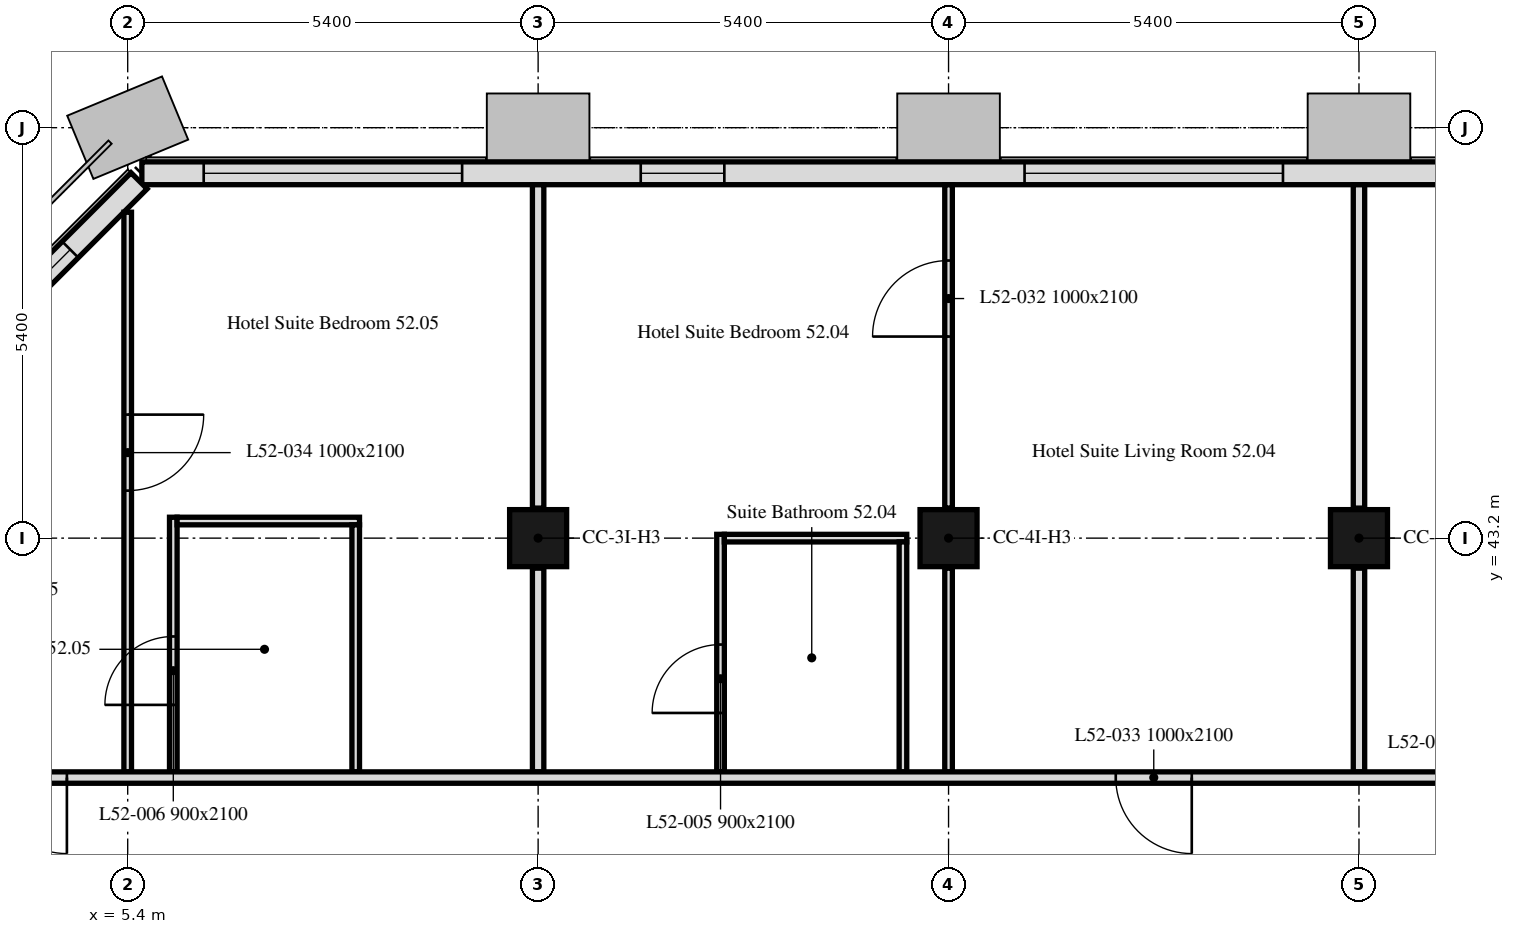
"""IFC4 building model, lengths in metres.
Left out: names, types, materials, properties, quantities, classifications, styles, units other than length and angle.
Written with IfcOpenShell. Run it as: python <this file> out.ifc"""

import sys

from ifc_helpers import new_model, si_unit, direction, frame, frame_2d, origin, origin_2d, place, context, subcontext, project, spatial, rectangle, extrude, element, fill, save


model = new_model("IFC4")
c1 = context("Model", 3, precision=1e-05, world=origin(), true_north=direction((0.0, 1.0)))
c2 = subcontext(c1, "Body", "Model", "MODEL_VIEW")
j1 = project(units=[si_unit("LENGTHUNIT", "METRE"), si_unit("PLANEANGLEUNIT", "RADIAN")], contexts=[c1])
p1 = place(None, origin())
s1 = spatial("IfcSite", under=j1, at=p1, CompositionType="ELEMENT")
p2 = place(p1, origin())
s2 = spatial("IfcBuilding", under=s1, at=p2, CompositionType="ELEMENT")
p3 = place(p2, frame((0.0, 0.0, 210.4)))
s3 = spatial("IfcBuildingStorey", under=s2, at=p3, CompositionType="ELEMENT", Elevation=210.4)
for number, where, z_axis, x_axis in (
    (1, (10.8, 43.2, 0.0), (0.0, 0.0, 1.0), (1.0, 0.0, 0.0)),
    (2, (16.2, 43.2, 0.0), (0.0, 0.0, 1.0), (1.0, 0.0, 0.0)),
    (3, (21.6, 43.2, 0.0), (0.0, 0.0, 1.0), (1.0, 0.0, 0.0)),
):
    element("IfcColumn", number, at=place(p3, frame(where, z_axis=z_axis, x_axis=x_axis)), inside=s3, PredefinedType="COLUMN", context=c2, shape_type="SweptSolid", body=[
        extrude(rectangle(XDim=0.75, YDim=0.75, at=origin_2d()), origin(), (0.0, 0.0, 1.0), 3.0),
    ])
p4 = place(p3, frame((37.614, 48.0, 0.0), z_axis=(0.0, 0.0, 1.0), x_axis=(-1.0, 0.0, 0.0)))
e4 = element("IfcWall", 4, at=p4, inside=s3, PredefinedType="SOLIDWALL", context=c2, shape_type="SweptSolid", body=[
    extrude(rectangle(XDim=32.027, YDim=0.3, at=frame_2d((16.014, 0.0))), origin(), (0.0, 0.0, 1.0), 3.0),
])
p5 = place(p4, frame((2.764, 0.0, 0.9)))
e5 = element("IfcOpeningElement", 5, at=p5, cuts=e4, PredefinedType="OPENING", context=c2, shape_type="SweptSolid", body=[
    extrude(rectangle(XDim=1.1, YDim=1.7, at=frame_2d((0.55, 0.85))), frame((0.0, 0.16, 0.0), z_axis=(0.0, -1.0, 0.0), x_axis=(1.0, 0.0, 0.0)), (0.0, 0.0, 1.0), 0.32),
])
p6 = place(p4, frame((6.214, 0.0, 0.9)))
e6 = element("IfcOpeningElement", 6, at=p6, cuts=e4, PredefinedType="OPENING", context=c2, shape_type="SweptSolid", body=[
    extrude(rectangle(XDim=3.4, YDim=1.7, at=frame_2d((1.7, 0.85))), frame((0.0, 0.16, 0.0), z_axis=(0.0, -1.0, 0.0), x_axis=(1.0, 0.0, 0.0)), (0.0, 0.0, 1.0), 0.32),
])
p7 = place(p4, frame((13.564, 0.0, 0.9)))
e7 = element("IfcOpeningElement", 7, at=p7, cuts=e4, PredefinedType="OPENING", context=c2, shape_type="SweptSolid", body=[
    extrude(rectangle(XDim=1.1, YDim=1.7, at=frame_2d((0.55, 0.85))), frame((0.0, 0.16, 0.0), z_axis=(0.0, -1.0, 0.0), x_axis=(1.0, 0.0, 0.0)), (0.0, 0.0, 1.0), 0.32),
])
p8 = place(p4, frame((17.014, 0.0, 0.9)))
e8 = element("IfcOpeningElement", 8, at=p8, cuts=e4, PredefinedType="OPENING", context=c2, shape_type="SweptSolid", body=[
    extrude(rectangle(XDim=3.4, YDim=1.7, at=frame_2d((1.7, 0.85))), frame((0.0, 0.16, 0.0), z_axis=(0.0, -1.0, 0.0), x_axis=(1.0, 0.0, 0.0)), (0.0, 0.0, 1.0), 0.32),
])
p9 = place(p4, frame((24.364, 0.0, 0.9)))
e9 = element("IfcOpeningElement", 9, at=p9, cuts=e4, PredefinedType="OPENING", context=c2, shape_type="SweptSolid", body=[
    extrude(rectangle(XDim=1.1, YDim=1.7, at=frame_2d((0.55, 0.85))), frame((0.0, 0.16, 0.0), z_axis=(0.0, -1.0, 0.0), x_axis=(1.0, 0.0, 0.0)), (0.0, 0.0, 1.0), 0.32),
])
p10 = place(p4, frame((27.814, 0.0, 0.9)))
e10 = element("IfcOpeningElement", 10, at=p10, cuts=e4, PredefinedType="OPENING", context=c2, shape_type="SweptSolid", body=[
    extrude(rectangle(XDim=3.4, YDim=1.7, at=frame_2d((1.7, 0.85))), frame((0.0, 0.16, 0.0), z_axis=(0.0, -1.0, 0.0), x_axis=(1.0, 0.0, 0.0)), (0.0, 0.0, 1.0), 0.32),
])
p11 = place(p3, frame((5.55, 47.901, 0.0), z_axis=(0.0, 0.0, 1.0), x_axis=(-0.707106781187, -0.707106781187, 0.0)))
e11 = element("IfcWall", 11, at=p11, inside=s3, PredefinedType="SOLIDWALL", context=c2, shape_type="SweptSolid", body=[
    extrude(rectangle(XDim=6.86, YDim=0.3, at=frame_2d((3.43, 0.0))), origin(), (0.0, 0.0, 1.0), 3.0),
])
p12 = place(p11, frame((1.28, 0.0, 0.9)))
e12 = element("IfcOpeningElement", 12, at=p12, cuts=e11, PredefinedType="OPENING", context=c2, shape_type="SweptSolid", body=[
    extrude(rectangle(XDim=1.1, YDim=1.7, at=frame_2d((0.55, 0.85))), frame((0.0, 0.16, 0.0), z_axis=(0.0, -1.0, 0.0), x_axis=(1.0, 0.0, 0.0)), (0.0, 0.0, 1.0), 0.32),
])
p13 = place(p11, frame((4.48, 0.0, 0.9)))
e13 = element("IfcOpeningElement", 13, at=p13, cuts=e11, PredefinedType="OPENING", context=c2, shape_type="SweptSolid", body=[
    extrude(rectangle(XDim=1.1, YDim=1.7, at=frame_2d((0.55, 0.85))), frame((0.0, 0.16, 0.0), z_axis=(0.0, -1.0, 0.0), x_axis=(1.0, 0.0, 0.0)), (0.0, 0.0, 1.0), 0.32),
])
p14 = place(p3, frame((21.6, 47.849, 0.0), z_axis=(0.0, 0.0, 1.0), x_axis=(0.0, -1.0, 0.0)))
e14 = element("IfcWall", 14, at=p14, inside=s3, PredefinedType="PARTITIONING", context=c2, shape_type="SweptSolid", body=[
    extrude(rectangle(XDim=4.254, YDim=0.15, at=frame_2d((2.127, 0.0))), origin(), (0.0, 0.0, 1.0), 2.4),
])
p15 = place(p3, frame((21.6, 42.805, 0.0), z_axis=(0.0, 0.0, 1.0), x_axis=(0.0, -1.0, 0.0)))
e15 = element("IfcWall", 15, at=p15, inside=s3, PredefinedType="PARTITIONING", context=c2, shape_type="SweptSolid", body=[
    extrude(rectangle(XDim=2.68, YDim=0.15, at=frame_2d((1.34, 0.0))), origin(), (0.0, 0.0, 1.0), 2.4),
])
p16 = place(p3, frame((10.8, 47.849, 0.0), z_axis=(0.0, 0.0, 1.0), x_axis=(0.0, -1.0, 0.0)))
e16 = element("IfcWall", 16, at=p16, inside=s3, PredefinedType="PARTITIONING", context=c2, shape_type="SweptSolid", body=[
    extrude(rectangle(XDim=4.254, YDim=0.15, at=frame_2d((2.127, 0.0))), origin(), (0.0, 0.0, 1.0), 2.4),
])
p17 = place(p3, frame((10.8, 42.805, 0.0), z_axis=(0.0, 0.0, 1.0), x_axis=(0.0, -1.0, 0.0)))
e17 = element("IfcWall", 17, at=p17, inside=s3, PredefinedType="PARTITIONING", context=c2, shape_type="SweptSolid", body=[
    extrude(rectangle(XDim=2.68, YDim=0.15, at=frame_2d((1.34, 0.0))), origin(), (0.0, 0.0, 1.0), 2.4),
])
p18 = place(p3, frame((13.2, 40.125, 0.0), z_axis=(0.0, 0.0, 1.0), x_axis=(0.0, 1.0, 0.0)))
e18 = element("IfcWall", 18, at=p18, inside=s3, PredefinedType="PARTITIONING", context=c2, shape_type="SweptSolid", body=[
    extrude(rectangle(XDim=3.125, YDim=0.1, at=frame_2d((1.562, 0.0))), origin(), (0.0, 0.0, 1.0), 3.0),
])
p19 = place(p18, frame((0.775, 0.0, 0.0)))
e19 = element("IfcOpeningElement", 19, at=p19, cuts=e18, PredefinedType="OPENING", context=c2, shape_type="SweptSolid", body=[
    extrude(rectangle(XDim=0.9, YDim=2.1, at=frame_2d((0.45, 1.05))), frame((0.0, 0.05, 0.0), z_axis=(0.0, -1.0, 0.0), x_axis=(1.0, 0.0, 0.0)), (0.0, 0.0, 1.0), 0.1),
])
p20 = place(p3, frame((13.25, 43.2, 0.0), z_axis=(0.0, 0.0, 1.0), x_axis=(1.0, 0.0, 0.0)))
e20 = element("IfcWall", 20, at=p20, inside=s3, PredefinedType="PARTITIONING", context=c2, shape_type="SweptSolid", body=[
    extrude(rectangle(XDim=2.4, YDim=0.1, at=frame_2d((1.2, 0.0))), origin(), (0.0, 0.0, 1.0), 3.0),
])
p21 = place(p3, frame((15.6, 43.15, 0.0), z_axis=(0.0, 0.0, 1.0), x_axis=(0.0, -1.0, 0.0)))
e21 = element("IfcWall", 21, at=p21, inside=s3, PredefinedType="PARTITIONING", context=c2, shape_type="SweptSolid", body=[
    extrude(rectangle(XDim=3.025, YDim=0.1, at=frame_2d((1.512, 0.0))), origin(), (0.0, 0.0, 1.0), 3.0),
])
p22 = place(p3, frame((16.2, 40.125, 0.0), z_axis=(0.0, 0.0, 1.0), x_axis=(0.0, 1.0, 0.0)))
e22 = element("IfcWall", 22, at=p22, inside=s3, PredefinedType="PARTITIONING", context=c2, shape_type="SweptSolid", body=[
    extrude(rectangle(XDim=2.68, YDim=0.1, at=frame_2d((1.34, 0.0))), origin(), (0.0, 0.0, 1.0), 2.4),
])
p23 = place(p3, frame((16.2, 43.595, 0.0), z_axis=(0.0, 0.0, 1.0), x_axis=(0.0, 1.0, 0.0)))
e23 = element("IfcWall", 23, at=p23, inside=s3, PredefinedType="PARTITIONING", context=c2, shape_type="SweptSolid", body=[
    extrude(rectangle(XDim=4.254, YDim=0.1, at=frame_2d((2.127, 0.0))), origin(), (0.0, 0.0, 1.0), 2.4),
])
p24 = place(p23, frame((2.257, 0.0, 0.0)))
e24 = element("IfcOpeningElement", 24, at=p24, cuts=e23, PredefinedType="OPENING", context=c2, shape_type="SweptSolid", body=[
    extrude(rectangle(XDim=1.0, YDim=2.1, at=frame_2d((0.5, 1.05))), frame((0.0, 0.05, 0.0), z_axis=(0.0, -1.0, 0.0), x_axis=(1.0, 0.0, 0.0)), (0.0, 0.0, 1.0), 0.1),
])
p25 = place(p3, frame((5.4, 47.488, 0.0), z_axis=(0.0, 0.0, 1.0), x_axis=(0.0, -1.0, 0.0)))
e25 = element("IfcWall", 25, at=p25, inside=s3, PredefinedType="PARTITIONING", context=c2, shape_type="SweptSolid", body=[
    extrude(rectangle(XDim=7.363, YDim=0.1, at=frame_2d((3.681, 0.0))), origin(), (0.0, 0.0, 1.0), 3.0),
])
p26 = place(p25, frame((2.663, 0.0, 0.0)))
e26 = element("IfcOpeningElement", 26, at=p26, cuts=e25, PredefinedType="OPENING", context=c2, shape_type="SweptSolid", body=[
    extrude(rectangle(XDim=1.0, YDim=2.1, at=frame_2d((0.5, 1.05))), frame((0.0, 0.05, 0.0), z_axis=(0.0, -1.0, 0.0), x_axis=(1.0, 0.0, 0.0)), (0.0, 0.0, 1.0), 0.1),
])
p27 = place(p3, frame((6.0, 40.125, 0.0), z_axis=(0.0, 0.0, 1.0), x_axis=(0.0, 1.0, 0.0)))
e27 = element("IfcWall", 27, at=p27, inside=s3, PredefinedType="PARTITIONING", context=c2, shape_type="SweptSolid", body=[
    extrude(rectangle(XDim=3.35, YDim=0.1, at=frame_2d((1.675, 0.0))), origin(), (0.0, 0.0, 1.0), 3.0),
])
p28 = place(p27, frame((0.881, 0.0, 0.0)))
e28 = element("IfcOpeningElement", 28, at=p28, cuts=e27, PredefinedType="OPENING", context=c2, shape_type="SweptSolid", body=[
    extrude(rectangle(XDim=0.9, YDim=2.1, at=frame_2d((0.45, 1.05))), frame((0.0, 0.05, 0.0), z_axis=(0.0, -1.0, 0.0), x_axis=(1.0, 0.0, 0.0)), (0.0, 0.0, 1.0), 0.1),
])
p29 = place(p3, frame((6.05, 43.425, 0.0), z_axis=(0.0, 0.0, 1.0), x_axis=(1.0, 0.0, 0.0)))
e29 = element("IfcWall", 29, at=p29, inside=s3, PredefinedType="PARTITIONING", context=c2, shape_type="SweptSolid", body=[
    extrude(rectangle(XDim=2.4, YDim=0.1, at=frame_2d((1.2, 0.0))), origin(), (0.0, 0.0, 1.0), 3.0),
])
p30 = place(p3, frame((8.4, 43.375, 0.0), z_axis=(0.0, 0.0, 1.0), x_axis=(0.0, -1.0, 0.0)))
e30 = element("IfcWall", 30, at=p30, inside=s3, PredefinedType="PARTITIONING", context=c2, shape_type="SweptSolid", body=[
    extrude(rectangle(XDim=3.25, YDim=0.1, at=frame_2d((1.625, 0.0))), origin(), (0.0, 0.0, 1.0), 3.0),
])
p31 = place(p3, frame((42.449, 40.05, 0.0), z_axis=(0.0, 0.0, 1.0), x_axis=(-1.0, 0.0, 0.0)))
e31 = element("IfcWall", 31, at=p31, inside=s3, PredefinedType="PARTITIONING", context=c2, shape_type="SweptSolid", body=[
    extrude(rectangle(XDim=41.698, YDim=0.15, at=frame_2d((20.849, 0.0))), origin(), (0.0, 0.0, 1.0), 2.4),
])
p32 = place(p31, frame((2.249, 0.0, 0.0)))
e32 = element("IfcOpeningElement", 32, at=p32, cuts=e31, PredefinedType="OPENING", context=c2, shape_type="SweptSolid", body=[
    extrude(rectangle(XDim=1.0, YDim=2.1, at=frame_2d((0.5, 1.05))), frame((0.0, 0.075, 0.0), z_axis=(0.0, -1.0, 0.0), x_axis=(1.0, 0.0, 0.0)), (0.0, 0.0, 1.0), 0.15),
])
p33 = place(p31, frame((6.849, 0.0, 0.0)))
e33 = element("IfcOpeningElement", 33, at=p33, cuts=e31, PredefinedType="OPENING", context=c2, shape_type="SweptSolid", body=[
    extrude(rectangle(XDim=1.0, YDim=2.1, at=frame_2d((0.5, 1.05))), frame((0.0, 0.075, 0.0), z_axis=(0.0, -1.0, 0.0), x_axis=(1.0, 0.0, 0.0)), (0.0, 0.0, 1.0), 0.15),
])
p34 = place(p31, frame((18.449, 0.0, 0.0)))
e34 = element("IfcOpeningElement", 34, at=p34, cuts=e31, PredefinedType="OPENING", context=c2, shape_type="SweptSolid", body=[
    extrude(rectangle(XDim=1.0, YDim=2.1, at=frame_2d((0.5, 1.05))), frame((0.0, 0.075, 0.0), z_axis=(0.0, -1.0, 0.0), x_axis=(1.0, 0.0, 0.0)), (0.0, 0.0, 1.0), 0.15),
])
p35 = place(p31, frame((23.049, 0.0, 0.0)))
e35 = element("IfcOpeningElement", 35, at=p35, cuts=e31, PredefinedType="OPENING", context=c2, shape_type="SweptSolid", body=[
    extrude(rectangle(XDim=1.0, YDim=2.1, at=frame_2d((0.5, 1.05))), frame((0.0, 0.075, 0.0), z_axis=(0.0, -1.0, 0.0), x_axis=(1.0, 0.0, 0.0)), (0.0, 0.0, 1.0), 0.15),
])
p36 = place(p31, frame((37.849, 0.0, 0.0)))
e36 = element("IfcOpeningElement", 36, at=p36, cuts=e31, PredefinedType="OPENING", context=c2, shape_type="SweptSolid", body=[
    extrude(rectangle(XDim=1.0, YDim=2.1, at=frame_2d((0.5, 1.05))), frame((0.0, 0.075, 0.0), z_axis=(0.0, -1.0, 0.0), x_axis=(1.0, 0.0, 0.0)), (0.0, 0.0, 1.0), 0.15),
])
p37 = place(p8, origin())
e37 = element("IfcWindow", 37, at=p37, inside=s3, PartitioningType="SINGLE_PANEL", PredefinedType="WINDOW", context=c2, shape_type="SweptSolid", body=[
    extrude(rectangle(XDim=3.4, YDim=1.7, at=frame_2d((1.7, 0.85))), frame((0.0, 0.03, 0.0), z_axis=(0.0, -1.0, 0.0), x_axis=(1.0, 0.0, 0.0)), (0.0, 0.0, 1.0), 0.06),
])
fill(e8, e37)
p38 = place(p9, origin())
e38 = element("IfcWindow", 38, at=p38, inside=s3, PartitioningType="SINGLE_PANEL", PredefinedType="WINDOW", context=c2, shape_type="SweptSolid", body=[
    extrude(rectangle(XDim=1.1, YDim=1.7, at=frame_2d((0.55, 0.85))), frame((0.0, 0.03, 0.0), z_axis=(0.0, -1.0, 0.0), x_axis=(1.0, 0.0, 0.0)), (0.0, 0.0, 1.0), 0.06),
])
fill(e9, e38)
p39 = place(p10, origin())
e39 = element("IfcWindow", 39, at=p39, inside=s3, PartitioningType="SINGLE_PANEL", PredefinedType="WINDOW", context=c2, shape_type="SweptSolid", body=[
    extrude(rectangle(XDim=3.4, YDim=1.7, at=frame_2d((1.7, 0.85))), frame((0.0, 0.03, 0.0), z_axis=(0.0, -1.0, 0.0), x_axis=(1.0, 0.0, 0.0)), (0.0, 0.0, 1.0), 0.06),
])
fill(e10, e39)
p40 = place(p12, origin())
e40 = element("IfcWindow", 40, at=p40, inside=s3, PartitioningType="SINGLE_PANEL", PredefinedType="WINDOW", context=c2, shape_type="SweptSolid", body=[
    extrude(rectangle(XDim=1.1, YDim=1.7, at=frame_2d((0.55, 0.85))), frame((0.0, 0.03, 0.0), z_axis=(0.0, -1.0, 0.0), x_axis=(1.0, 0.0, 0.0)), (0.0, 0.0, 1.0), 0.06),
])
fill(e12, e40)
p41 = place(p19, origin())
e41 = element("IfcDoor", 41, at=p41, inside=s3, OperationType="SINGLE_SWING_RIGHT", PredefinedType="DOOR", context=c2, shape_type="SweptSolid", body=[
    extrude(rectangle(XDim=0.9, YDim=2.1, at=frame_2d((0.45, 1.05))), frame((0.0, 0.025, 0.0), z_axis=(0.0, -1.0, 0.0), x_axis=(1.0, 0.0, 0.0)), (0.0, 0.0, 1.0), 0.05),
])
fill(e19, e41)
p42 = place(p28, origin())
e42 = element("IfcDoor", 42, at=p42, inside=s3, OperationType="SINGLE_SWING_LEFT", PredefinedType="DOOR", context=c2, shape_type="SweptSolid", body=[
    extrude(rectangle(XDim=0.9, YDim=2.1, at=frame_2d((0.45, 1.05))), frame((0.0, 0.025, 0.0), z_axis=(0.0, -1.0, 0.0), x_axis=(1.0, 0.0, 0.0)), (0.0, 0.0, 1.0), 0.05),
])
fill(e28, e42)
p43 = place(p24, origin())
e43 = element("IfcDoor", 43, at=p43, inside=s3, OperationType="SINGLE_SWING_RIGHT", PredefinedType="DOOR", context=c2, shape_type="SweptSolid", body=[
    extrude(rectangle(XDim=1.0, YDim=2.1, at=frame_2d((0.5, 1.05))), frame((0.0, 0.025, 0.0), z_axis=(0.0, -1.0, 0.0), x_axis=(1.0, 0.0, 0.0)), (0.0, 0.0, 1.0), 0.05),
])
fill(e24, e43)
p44 = place(p35, origin())
e44 = element("IfcDoor", 44, at=p44, inside=s3, OperationType="SINGLE_SWING_RIGHT", PredefinedType="DOOR", context=c2, shape_type="SweptSolid", body=[
    extrude(rectangle(XDim=1.0, YDim=2.1, at=frame_2d((0.5, 1.05))), frame((0.0, 0.025, 0.0), z_axis=(0.0, -1.0, 0.0), x_axis=(1.0, 0.0, 0.0)), (0.0, 0.0, 1.0), 0.05),
])
fill(e35, e44)
p45 = place(p26, origin())
e45 = element("IfcDoor", 45, at=p45, inside=s3, OperationType="SINGLE_SWING_LEFT", PredefinedType="DOOR", context=c2, shape_type="SweptSolid", body=[
    extrude(rectangle(XDim=1.0, YDim=2.1, at=frame_2d((0.5, 1.05))), frame((0.0, 0.025, 0.0), z_axis=(0.0, -1.0, 0.0), x_axis=(1.0, 0.0, 0.0)), (0.0, 0.0, 1.0), 0.05),
])
fill(e26, e45)
p46 = place(p36, origin())
e46 = element("IfcDoor", 46, at=p46, inside=s3, OperationType="SINGLE_SWING_RIGHT", PredefinedType="DOOR", context=c2, shape_type="SweptSolid", body=[
    extrude(rectangle(XDim=1.0, YDim=2.1, at=frame_2d((0.5, 1.05))), frame((0.0, 0.025, 0.0), z_axis=(0.0, -1.0, 0.0), x_axis=(1.0, 0.0, 0.0)), (0.0, 0.0, 1.0), 0.05),
])
fill(e36, e46)
save(model, sys.argv[1])
